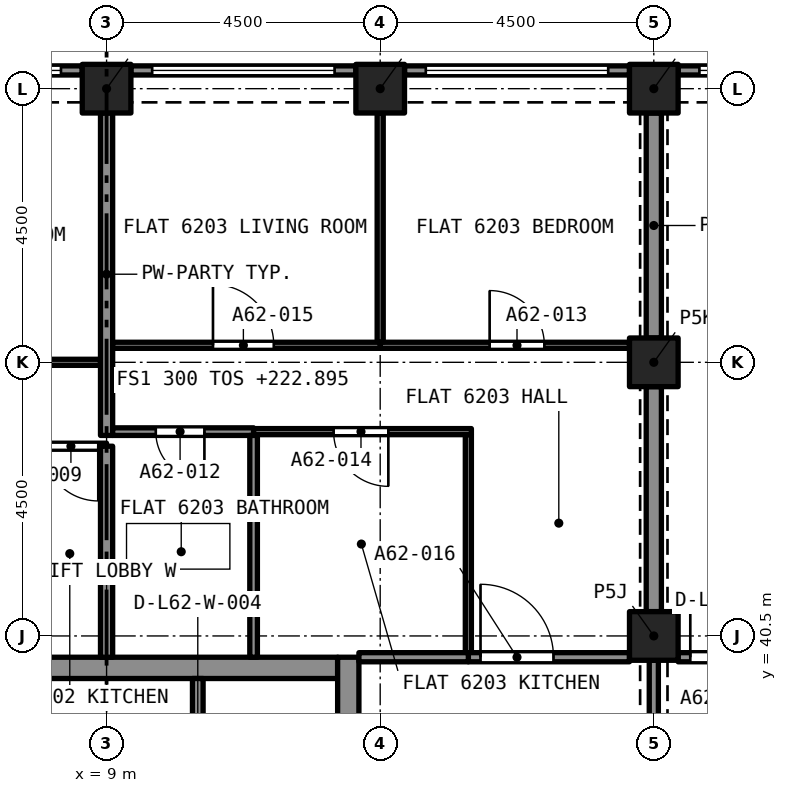
"""IFC4 building model, lengths in metres.
Left out: names, types, materials, properties, quantities, classifications, styles, units other than length and angle.
Written with IfcOpenShell. Run it as: python <this file> out.ifc"""

import sys

from ifc_helpers import new_model, si_unit, direction, frame, frame_2d, origin, origin_2d, place, context, subcontext, project, spatial, rectangle, extrude, element, fill, save


model = new_model("IFC4")
c1 = context("Model", 3, precision=1e-05, world=origin(), true_north=direction((0.0, 1.0)))
c2 = subcontext(c1, "Body", "Model", "MODEL_VIEW")
j1 = project(units=[si_unit("LENGTHUNIT", "METRE"), si_unit("PLANEANGLEUNIT", "RADIAN")], contexts=[c1])
p1 = place(None, origin())
s1 = spatial("IfcSite", under=j1, at=p1, CompositionType="ELEMENT")
p2 = place(p1, origin())
s2 = spatial("IfcBuilding", under=s1, at=p2, CompositionType="ELEMENT")
p3 = place(p2, frame((0.0, 0.0, 222.895)))
s3 = spatial("IfcBuildingStorey", under=s2, at=p3, CompositionType="ELEMENT", Elevation=222.895)
for number, where, z_axis, x_axis in (
    (1, (18.0, 40.5, 0.0), (0.0, 0.0, 1.0), (1.0, 0.0, 0.0)),
    (2, (18.0, 45.0, 0.0), (0.0, 0.0, 1.0), (1.0, 0.0, 0.0)),
    (3, (9.0, 49.5, 0.0), (0.0, 0.0, 1.0), (1.0, 0.0, 0.0)),
    (4, (13.5, 49.5, 0.0), (0.0, 0.0, 1.0), (1.0, 0.0, 0.0)),
    (5, (18.0, 49.5, 0.0), (0.0, 0.0, 1.0), (1.0, 0.0, 0.0)),
):
    element("IfcColumn", number, at=place(p3, frame(where, z_axis=z_axis, x_axis=x_axis)), inside=s3, PredefinedType="COLUMN", context=c2, shape_type="SweptSolid", body=[
        extrude(rectangle(XDim=0.8, YDim=0.8, at=origin_2d()), origin(), (0.0, 0.0, 1.0), 3.2),
    ])
p4 = place(p3, frame((5.2, 39.975, 0.0), z_axis=(0.0, 0.0, 1.0), x_axis=(1.0, 0.0, 0.0)))
e6 = element("IfcWall", 6, at=p4, inside=s3, PredefinedType="SOLIDWALL", context=c2, shape_type="SweptSolid", body=[
    extrude(rectangle(XDim=7.6, YDim=0.35, at=frame_2d((3.8, 0.0))), origin(), (0.0, 0.0, 1.0), 3.2),
])
p5 = place(p3, frame((12.975, 27.35, 0.0), z_axis=(0.0, 0.0, 1.0), x_axis=(0.0, 1.0, 0.0)))
e7 = element("IfcWall", 7, at=p5, inside=s3, PredefinedType="SOLIDWALL", context=c2, shape_type="SweptSolid", body=[
    extrude(rectangle(XDim=12.8, YDim=0.35, at=frame_2d((6.4, 0.0))), origin(), (0.0, 0.0, 1.0), 3.2),
])
p6 = place(p5, frame((10.75, 0.0, 0.0)))
e8 = element("IfcOpeningElement", 8, at=p6, cuts=e7, PredefinedType="OPENING", context=c2, shape_type="SweptSolid", body=[
    extrude(rectangle(XDim=1.1, YDim=2.1, at=frame_2d((0.55, 1.05))), frame((0.0, 0.185, 0.0), z_axis=(0.0, -1.0, 0.0), x_axis=(1.0, 0.0, 0.0)), (0.0, 0.0, 1.0), 0.37),
])
p7 = place(p5, frame((8.6, 0.0, 0.0)))
e9 = element("IfcOpeningElement", 9, at=p7, cuts=e7, PredefinedType="OPENING", context=c2, shape_type="SweptSolid", body=[
    extrude(rectangle(XDim=1.2, YDim=2.1, at=frame_2d((0.6, 1.05))), frame((0.0, 0.185, 0.0), z_axis=(0.0, -1.0, 0.0), x_axis=(1.0, 0.0, 0.0)), (0.0, 0.0, 1.0), 0.37),
])
p8 = place(p3, frame((18.4, 49.8, 0.0), z_axis=(0.0, 0.0, 1.0), x_axis=(1.0, 0.0, 0.0)))
e10 = element("IfcWall", 10, at=p8, inside=s3, PredefinedType="SOLIDWALL", context=c2, shape_type="SweptSolid", body=[
    extrude(rectangle(XDim=3.7, YDim=0.15, at=frame_2d((1.85, 0.0))), origin(), (0.0, 0.0, 1.0), 3.2),
])
p9 = place(p8, frame((0.35, 0.0, 0.45)))
e11 = element("IfcOpeningElement", 11, at=p9, cuts=e10, PredefinedType="OPENING", context=c2, shape_type="SweptSolid", body=[
    extrude(rectangle(XDim=3.0, YDim=1.95, at=frame_2d((1.5, 0.975))), frame((0.0, 0.085, 0.0), z_axis=(0.0, -1.0, 0.0), x_axis=(1.0, 0.0, 0.0)), (0.0, 0.0, 1.0), 0.17),
])
p10 = place(p3, frame((13.9, 49.8, 0.0), z_axis=(0.0, 0.0, 1.0), x_axis=(1.0, 0.0, 0.0)))
e12 = element("IfcWall", 12, at=p10, inside=s3, PredefinedType="SOLIDWALL", context=c2, shape_type="SweptSolid", body=[
    extrude(rectangle(XDim=3.7, YDim=0.15, at=frame_2d((1.85, 0.0))), origin(), (0.0, 0.0, 1.0), 3.2),
])
p11 = place(p10, frame((0.35, 0.0, 0.45)))
e13 = element("IfcOpeningElement", 13, at=p11, cuts=e12, PredefinedType="OPENING", context=c2, shape_type="SweptSolid", body=[
    extrude(rectangle(XDim=3.0, YDim=1.95, at=frame_2d((1.5, 0.975))), frame((0.0, 0.085, 0.0), z_axis=(0.0, -1.0, 0.0), x_axis=(1.0, 0.0, 0.0)), (0.0, 0.0, 1.0), 0.17),
])
p12 = place(p3, frame((9.4, 49.8, 0.0), z_axis=(0.0, 0.0, 1.0), x_axis=(1.0, 0.0, 0.0)))
e14 = element("IfcWall", 14, at=p12, inside=s3, PredefinedType="SOLIDWALL", context=c2, shape_type="SweptSolid", body=[
    extrude(rectangle(XDim=3.7, YDim=0.15, at=frame_2d((1.85, 0.0))), origin(), (0.0, 0.0, 1.0), 3.2),
])
p13 = place(p12, frame((0.35, 0.0, 0.45)))
e15 = element("IfcOpeningElement", 15, at=p13, cuts=e14, PredefinedType="OPENING", context=c2, shape_type="SweptSolid", body=[
    extrude(rectangle(XDim=3.0, YDim=1.95, at=frame_2d((1.5, 0.975))), frame((0.0, 0.085, 0.0), z_axis=(0.0, -1.0, 0.0), x_axis=(1.0, 0.0, 0.0)), (0.0, 0.0, 1.0), 0.17),
])
p14 = place(p3, frame((4.9, 49.8, 0.0), z_axis=(0.0, 0.0, 1.0), x_axis=(1.0, 0.0, 0.0)))
e16 = element("IfcWall", 16, at=p14, inside=s3, PredefinedType="SOLIDWALL", context=c2, shape_type="SweptSolid", body=[
    extrude(rectangle(XDim=3.7, YDim=0.15, at=frame_2d((1.85, 0.0))), origin(), (0.0, 0.0, 1.0), 3.2),
])
p15 = place(p14, frame((0.35, 0.0, 0.45)))
e17 = element("IfcOpeningElement", 17, at=p15, cuts=e16, PredefinedType="OPENING", context=c2, shape_type="SweptSolid", body=[
    extrude(rectangle(XDim=3.0, YDim=1.95, at=frame_2d((1.5, 0.975))), frame((0.0, 0.085, 0.0), z_axis=(0.0, -1.0, 0.0), x_axis=(1.0, 0.0, 0.0)), (0.0, 0.0, 1.0), 0.17),
])
p16 = place(p3, frame((4.5, 45.0, 0.0), z_axis=(0.0, 0.0, 1.0), x_axis=(1.0, 0.0, 0.0)))
e18 = element("IfcWall", 18, at=p16, inside=s3, PredefinedType="PARTITIONING", context=c2, shape_type="SweptSolid", body=[
    extrude(rectangle(XDim=4.4, YDim=0.1, at=frame_2d((2.2, 0.0))), origin(), (0.0, 0.0, 1.0), 2.9),
])
p17 = place(p16, frame((1.8, 0.0, 0.0)))
e19 = element("IfcOpeningElement", 19, at=p17, cuts=e18, PredefinedType="OPENING", context=c2, shape_type="SweptSolid", body=[
    extrude(rectangle(XDim=0.9, YDim=2.1, at=frame_2d((0.45, 1.05))), frame((0.0, 0.06, 0.0), z_axis=(0.0, -1.0, 0.0), x_axis=(1.0, 0.0, 0.0)), (0.0, 0.0, 1.0), 0.12),
])
p18 = place(p3, frame((9.0, 43.62, 0.0), z_axis=(0.0, 0.0, 1.0), x_axis=(-1.0, 0.0, 0.0)))
e20 = element("IfcWall", 20, at=p18, inside=s3, PredefinedType="PARTITIONING", context=c2, shape_type="SweptSolid", body=[
    extrude(rectangle(XDim=1.173, YDim=0.1, at=frame_2d((0.586, 0.0))), origin(), (0.0, 0.0, 1.0), 2.9),
])
p19 = place(p18, frame((0.136, 0.0, 0.0)))
e21 = element("IfcOpeningElement", 21, at=p19, cuts=e20, PredefinedType="OPENING", context=c2, shape_type="SweptSolid", body=[
    extrude(rectangle(XDim=0.9, YDim=2.1, at=frame_2d((0.45, 1.05))), frame((0.0, 0.06, 0.0), z_axis=(0.0, -1.0, 0.0), x_axis=(1.0, 0.0, 0.0)), (0.0, 0.0, 1.0), 0.12),
])
p20 = place(p3, frame((9.0, 43.798, 0.0), z_axis=(0.0, 0.0, 1.0), x_axis=(0.0, 1.0, 0.0)))
e22 = element("IfcWall", 22, at=p20, inside=s3, PredefinedType="PARTITIONING", context=c2, shape_type="SweptSolid", body=[
    extrude(rectangle(XDim=5.302, YDim=0.2, at=frame_2d((2.651, 0.0))), origin(), (0.0, 0.0, 1.0), 2.9),
])
p21 = place(p3, frame((9.0, 40.15, 0.0), z_axis=(0.0, 0.0, 1.0), x_axis=(0.0, 1.0, 0.0)))
e23 = element("IfcWall", 23, at=p21, inside=s3, PredefinedType="PARTITIONING", context=c2, shape_type="SweptSolid", body=[
    extrude(rectangle(XDim=3.47, YDim=0.2, at=frame_2d((1.735, 0.0))), origin(), (0.0, 0.0, 1.0), 2.9),
])
p22 = place(p3, frame((11.418, 43.86, 0.0), z_axis=(0.0, 0.0, 1.0), x_axis=(-1.0, 0.0, 0.0)))
e24 = element("IfcWall", 24, at=p22, inside=s3, PredefinedType="PARTITIONING", context=c2, shape_type="SweptSolid", body=[
    extrude(rectangle(XDim=2.318, YDim=0.125, at=frame_2d((1.159, 0.0))), origin(), (0.0, 0.0, 1.0), 2.9),
])
p23 = place(p22, frame((0.809, 0.0, 0.0)))
e25 = element("IfcOpeningElement", 25, at=p23, cuts=e24, PredefinedType="OPENING", context=c2, shape_type="SweptSolid", body=[
    extrude(rectangle(XDim=0.8, YDim=2.1, at=frame_2d((0.4, 1.05))), frame((0.0, 0.073, 0.0), z_axis=(0.0, -1.0, 0.0), x_axis=(1.0, 0.0, 0.0)), (0.0, 0.0, 1.0), 0.145),
])
p24 = place(p3, frame((11.418, 40.15, 0.0), z_axis=(0.0, 0.0, 1.0), x_axis=(0.0, 1.0, 0.0)))
e26 = element("IfcWall", 26, at=p24, inside=s3, PredefinedType="PARTITIONING", context=c2, shape_type="SweptSolid", body=[
    extrude(rectangle(XDim=3.648, YDim=0.125, at=frame_2d((1.824, 0.0))), origin(), (0.0, 0.0, 1.0), 2.9),
])
p25 = place(p3, frame((13.5, 45.28, 0.0), z_axis=(0.0, 0.0, 1.0), x_axis=(1.0, 0.0, 0.0)))
e27 = element("IfcWall", 27, at=p25, inside=s3, PredefinedType="PARTITIONING", context=c2, shape_type="SweptSolid", body=[
    extrude(rectangle(XDim=4.1, YDim=0.1, at=frame_2d((2.05, 0.0))), origin(), (0.0, 0.0, 1.0), 2.9),
])
p26 = place(p25, frame((1.8, 0.0, 0.0)))
e28 = element("IfcOpeningElement", 28, at=p26, cuts=e27, PredefinedType="OPENING", context=c2, shape_type="SweptSolid", body=[
    extrude(rectangle(XDim=0.9, YDim=2.1, at=frame_2d((0.45, 1.05))), frame((0.0, 0.06, 0.0), z_axis=(0.0, -1.0, 0.0), x_axis=(1.0, 0.0, 0.0)), (0.0, 0.0, 1.0), 0.12),
])
p27 = place(p3, frame((13.5, 45.33, 0.0), z_axis=(0.0, 0.0, 1.0), x_axis=(0.0, 1.0, 0.0)))
e29 = element("IfcWall", 29, at=p27, inside=s3, PredefinedType="PARTITIONING", context=c2, shape_type="SweptSolid", body=[
    extrude(rectangle(XDim=3.77, YDim=0.1, at=frame_2d((1.885, 0.0))), origin(), (0.0, 0.0, 1.0), 2.9),
])
p28 = place(p3, frame((18.0, 45.4, 0.0), z_axis=(0.0, 0.0, 1.0), x_axis=(0.0, 1.0, 0.0)))
e30 = element("IfcWall", 30, at=p28, inside=s3, PredefinedType="PARTITIONING", context=c2, shape_type="SweptSolid", body=[
    extrude(rectangle(XDim=3.7, YDim=0.25, at=frame_2d((1.85, 0.0))), origin(), (0.0, 0.0, 1.0), 2.38),
])
p29 = place(p3, frame((14.95, 40.225, 0.0), z_axis=(0.0, 0.0, 1.0), x_axis=(0.0, 1.0, 0.0)))
e31 = element("IfcWall", 31, at=p29, inside=s3, PredefinedType="PARTITIONING", context=c2, shape_type="SweptSolid", body=[
    extrude(rectangle(XDim=3.585, YDim=0.1, at=frame_2d((1.792, 0.0))), origin(), (0.0, 0.0, 1.0), 2.9),
])
p30 = place(p3, frame((15.0, 43.86, 0.0), z_axis=(0.0, 0.0, 1.0), x_axis=(-1.0, 0.0, 0.0)))
e32 = element("IfcWall", 32, at=p30, inside=s3, PredefinedType="PARTITIONING", context=c2, shape_type="SweptSolid", body=[
    extrude(rectangle(XDim=3.582, YDim=0.1, at=frame_2d((1.791, 0.0))), origin(), (0.0, 0.0, 1.0), 2.9),
])
p31 = place(p30, frame((1.366, 0.0, 0.0)))
e33 = element("IfcOpeningElement", 33, at=p31, cuts=e32, PredefinedType="OPENING", context=c2, shape_type="SweptSolid", body=[
    extrude(rectangle(XDim=0.9, YDim=2.1, at=frame_2d((0.45, 1.05))), frame((0.0, 0.06, 0.0), z_axis=(0.0, -1.0, 0.0), x_axis=(1.0, 0.0, 0.0)), (0.0, 0.0, 1.0), 0.12),
])
p32 = place(p3, frame((9.1, 45.28, 0.0), z_axis=(0.0, 0.0, 1.0), x_axis=(1.0, 0.0, 0.0)))
e34 = element("IfcWall", 34, at=p32, inside=s3, PredefinedType="PARTITIONING", context=c2, shape_type="SweptSolid", body=[
    extrude(rectangle(XDim=4.4, YDim=0.1, at=frame_2d((2.2, 0.0))), origin(), (0.0, 0.0, 1.0), 2.9),
])
p33 = place(p32, frame((1.65, 0.0, 0.0)))
e35 = element("IfcOpeningElement", 35, at=p33, cuts=e34, PredefinedType="OPENING", context=c2, shape_type="SweptSolid", body=[
    extrude(rectangle(XDim=1.0, YDim=2.1, at=frame_2d((0.5, 1.05))), frame((0.0, 0.06, 0.0), z_axis=(0.0, -1.0, 0.0), x_axis=(1.0, 0.0, 0.0)), (0.0, 0.0, 1.0), 0.12),
])
p34 = place(p3, frame((18.0, 40.9, 0.0), z_axis=(0.0, 0.0, 1.0), x_axis=(0.0, 1.0, 0.0)))
e36 = element("IfcWall", 36, at=p34, inside=s3, PredefinedType="PARTITIONING", context=c2, shape_type="SweptSolid", body=[
    extrude(rectangle(XDim=3.7, YDim=0.25, at=frame_2d((1.85, 0.0))), origin(), (0.0, 0.0, 1.0), 2.38),
])
p35 = place(p3, frame((14.95, 40.15, 0.0), z_axis=(0.0, 0.0, 1.0), x_axis=(1.0, 0.0, 0.0)))
e37 = element("IfcWall", 37, at=p35, inside=s3, PredefinedType="PARTITIONING", context=c2, shape_type="SweptSolid", body=[
    extrude(rectangle(XDim=2.65, YDim=0.15, at=frame_2d((1.325, 0.0))), origin(), (0.0, 0.0, 1.0), 2.9),
])
p36 = place(p35, frame((0.2, 0.0, 0.0)))
e38 = element("IfcOpeningElement", 38, at=p36, cuts=e37, PredefinedType="OPENING", context=c2, shape_type="SweptSolid", body=[
    extrude(rectangle(XDim=1.2, YDim=2.4, at=frame_2d((0.6, 1.2))), frame((0.0, 0.085, 0.0), z_axis=(0.0, -1.0, 0.0), x_axis=(1.0, 0.0, 0.0)), (0.0, 0.0, 1.0), 0.17),
])
p37 = place(p3, frame((13.15, 40.15, 0.0), z_axis=(0.0, 0.0, 1.0), x_axis=(1.0, 0.0, 0.0)))
e39 = element("IfcWall", 39, at=p37, inside=s3, PredefinedType="PARTITIONING", context=c2, shape_type="SweptSolid", body=[
    extrude(rectangle(XDim=1.8, YDim=0.15, at=frame_2d((0.9, 0.0))), origin(), (0.0, 0.0, 1.0), 2.9),
])
p38 = place(p3, frame((18.4, 40.15, 0.0), z_axis=(0.0, 0.0, 1.0), x_axis=(1.0, 0.0, 0.0)))
e40 = element("IfcWall", 40, at=p38, inside=s3, PredefinedType="PARTITIONING", context=c2, shape_type="SweptSolid", body=[
    extrude(rectangle(XDim=2.2, YDim=0.15, at=frame_2d((1.1, 0.0))), origin(), (0.0, 0.0, 1.0), 2.75),
])
p39 = place(p38, frame((0.2, 0.0, 0.0)))
e41 = element("IfcOpeningElement", 41, at=p39, cuts=e40, PredefinedType="OPENING", context=c2, shape_type="SweptSolid", body=[
    extrude(rectangle(XDim=1.0, YDim=2.1, at=frame_2d((0.5, 1.05))), frame((0.0, 0.085, 0.0), z_axis=(0.0, -1.0, 0.0), x_axis=(1.0, 0.0, 0.0)), (0.0, 0.0, 1.0), 0.17),
])
p40 = place(p3, frame((18.0, 40.1, 0.0), z_axis=(0.0, 0.0, 1.0), x_axis=(0.0, -1.0, 0.0)))
e42 = element("IfcWall", 42, at=p40, inside=s3, PredefinedType="PARTITIONING", context=c2, shape_type="SweptSolid", body=[
    extrude(rectangle(XDim=3.7, YDim=0.15, at=frame_2d((1.85, 0.0))), origin(), (0.0, 0.0, 1.0), 2.38),
])
p41 = place(p40, frame((1.25, 0.0, 0.0)))
e43 = element("IfcOpeningElement", 43, at=p41, cuts=e42, PredefinedType="OPENING", context=c2, shape_type="SweptSolid", body=[
    extrude(rectangle(XDim=1.2, YDim=2.1, at=frame_2d((0.6, 1.05))), frame((0.0, 0.085, 0.0), z_axis=(0.0, -1.0, 0.0), x_axis=(1.0, 0.0, 0.0)), (0.0, 0.0, 1.0), 0.17),
])
p42 = place(p3, frame((10.5, 37.5, 0.0), z_axis=(0.0, 0.0, 1.0), x_axis=(0.0, 1.0, 0.0)))
e44 = element("IfcWall", 44, at=p42, inside=s3, PredefinedType="SOLIDWALL", context=c2, shape_type="SweptSolid", body=[
    extrude(rectangle(XDim=2.3, YDim=0.175, at=frame_2d((1.15, 0.0))), origin(), (0.0, 0.0, 1.0), 2.9),
])
p43 = place(p42, frame((0.65, 0.0, 0.0)))
e45 = element("IfcOpeningElement", 45, at=p43, cuts=e44, PredefinedType="OPENING", context=c2, shape_type="SweptSolid", body=[
    extrude(rectangle(XDim=1.0, YDim=2.1, at=frame_2d((0.5, 1.05))), frame((0.0, 0.097, 0.0), z_axis=(0.0, -1.0, 0.0), x_axis=(1.0, 0.0, 0.0)), (0.0, 0.0, 1.0), 0.195),
])
p44 = place(p9, origin())
e46 = element("IfcWindow", 46, at=p44, inside=s3, PartitioningType="SINGLE_PANEL", PredefinedType="WINDOW", context=c2, shape_type="SweptSolid", body=[
    extrude(rectangle(XDim=3.0, YDim=1.95, at=frame_2d((1.5, 0.975))), frame((0.0, 0.03, 0.0), z_axis=(0.0, -1.0, 0.0), x_axis=(1.0, 0.0, 0.0)), (0.0, 0.0, 1.0), 0.06),
])
fill(e11, e46)
p45 = place(p11, origin())
e47 = element("IfcWindow", 47, at=p45, inside=s3, PartitioningType="SINGLE_PANEL", PredefinedType="WINDOW", context=c2, shape_type="SweptSolid", body=[
    extrude(rectangle(XDim=3.0, YDim=1.95, at=frame_2d((1.5, 0.975))), frame((0.0, 0.03, 0.0), z_axis=(0.0, -1.0, 0.0), x_axis=(1.0, 0.0, 0.0)), (0.0, 0.0, 1.0), 0.06),
])
fill(e13, e47)
p46 = place(p13, origin())
e48 = element("IfcWindow", 48, at=p46, inside=s3, PartitioningType="SINGLE_PANEL", PredefinedType="WINDOW", context=c2, shape_type="SweptSolid", body=[
    extrude(rectangle(XDim=3.0, YDim=1.95, at=frame_2d((1.5, 0.975))), frame((0.0, 0.03, 0.0), z_axis=(0.0, -1.0, 0.0), x_axis=(1.0, 0.0, 0.0)), (0.0, 0.0, 1.0), 0.06),
])
fill(e15, e48)
p47 = place(p15, origin())
e49 = element("IfcWindow", 49, at=p47, inside=s3, PartitioningType="SINGLE_PANEL", PredefinedType="WINDOW", context=c2, shape_type="SweptSolid", body=[
    extrude(rectangle(XDim=3.0, YDim=1.95, at=frame_2d((1.5, 0.975))), frame((0.0, 0.03, 0.0), z_axis=(0.0, -1.0, 0.0), x_axis=(1.0, 0.0, 0.0)), (0.0, 0.0, 1.0), 0.06),
])
fill(e17, e49)
p48 = place(p19, origin())
e50 = element("IfcDoor", 50, at=p48, inside=s3, OperationType="SINGLE_SWING_RIGHT", PredefinedType="DOOR", context=c2, shape_type="SweptSolid", body=[
    extrude(rectangle(XDim=0.9, YDim=2.1, at=frame_2d((0.45, 1.05))), frame((0.0, 0.025, 0.0), z_axis=(0.0, -1.0, 0.0), x_axis=(1.0, 0.0, 0.0)), (0.0, 0.0, 1.0), 0.05),
])
fill(e21, e50)
p49 = place(p23, origin())
e51 = element("IfcDoor", 51, at=p49, inside=s3, OperationType="SINGLE_SWING_RIGHT", PredefinedType="DOOR", context=c2, shape_type="SweptSolid", body=[
    extrude(rectangle(XDim=0.8, YDim=2.1, at=frame_2d((0.4, 1.05))), frame((0.0, 0.025, 0.0), z_axis=(0.0, -1.0, 0.0), x_axis=(1.0, 0.0, 0.0)), (0.0, 0.0, 1.0), 0.05),
])
fill(e25, e51)
p50 = place(p26, origin())
e52 = element("IfcDoor", 52, at=p50, inside=s3, OperationType="SINGLE_SWING_RIGHT", PredefinedType="DOOR", context=c2, shape_type="SweptSolid", body=[
    extrude(rectangle(XDim=0.9, YDim=2.1, at=frame_2d((0.45, 1.05))), frame((0.0, 0.025, 0.0), z_axis=(0.0, -1.0, 0.0), x_axis=(1.0, 0.0, 0.0)), (0.0, 0.0, 1.0), 0.05),
])
fill(e28, e52)
p51 = place(p31, origin())
e53 = element("IfcDoor", 53, at=p51, inside=s3, OperationType="SINGLE_SWING_RIGHT", PredefinedType="DOOR", context=c2, shape_type="SweptSolid", body=[
    extrude(rectangle(XDim=0.9, YDim=2.1, at=frame_2d((0.45, 1.05))), frame((0.0, 0.025, 0.0), z_axis=(0.0, -1.0, 0.0), x_axis=(1.0, 0.0, 0.0)), (0.0, 0.0, 1.0), 0.05),
])
fill(e33, e53)
p52 = place(p33, origin())
e54 = element("IfcDoor", 54, at=p52, inside=s3, OperationType="SINGLE_SWING_LEFT", PredefinedType="DOOR", context=c2, shape_type="SweptSolid", body=[
    extrude(rectangle(XDim=1.0, YDim=2.1, at=frame_2d((0.5, 1.05))), frame((0.0, 0.025, 0.0), z_axis=(0.0, -1.0, 0.0), x_axis=(1.0, 0.0, 0.0)), (0.0, 0.0, 1.0), 0.05),
])
fill(e35, e54)
p53 = place(p36, origin())
e55 = element("IfcDoor", 55, at=p53, inside=s3, OperationType="SINGLE_SWING_LEFT", PredefinedType="DOOR", context=c2, shape_type="SweptSolid", body=[
    extrude(rectangle(XDim=1.2, YDim=2.4, at=frame_2d((0.6, 1.2))), frame((0.0, 0.025, 0.0), z_axis=(0.0, -1.0, 0.0), x_axis=(1.0, 0.0, 0.0)), (0.0, 0.0, 1.0), 0.05),
])
fill(e38, e55)
p54 = place(p39, origin())
e56 = element("IfcDoor", 56, at=p54, inside=s3, OperationType="SINGLE_SWING_LEFT", PredefinedType="DOOR", context=c2, shape_type="SweptSolid", body=[
    extrude(rectangle(XDim=1.0, YDim=2.1, at=frame_2d((0.5, 1.05))), frame((0.0, 0.025, 0.0), z_axis=(0.0, -1.0, 0.0), x_axis=(1.0, 0.0, 0.0)), (0.0, 0.0, 1.0), 0.05),
])
fill(e41, e56)
save(model, sys.argv[1])
